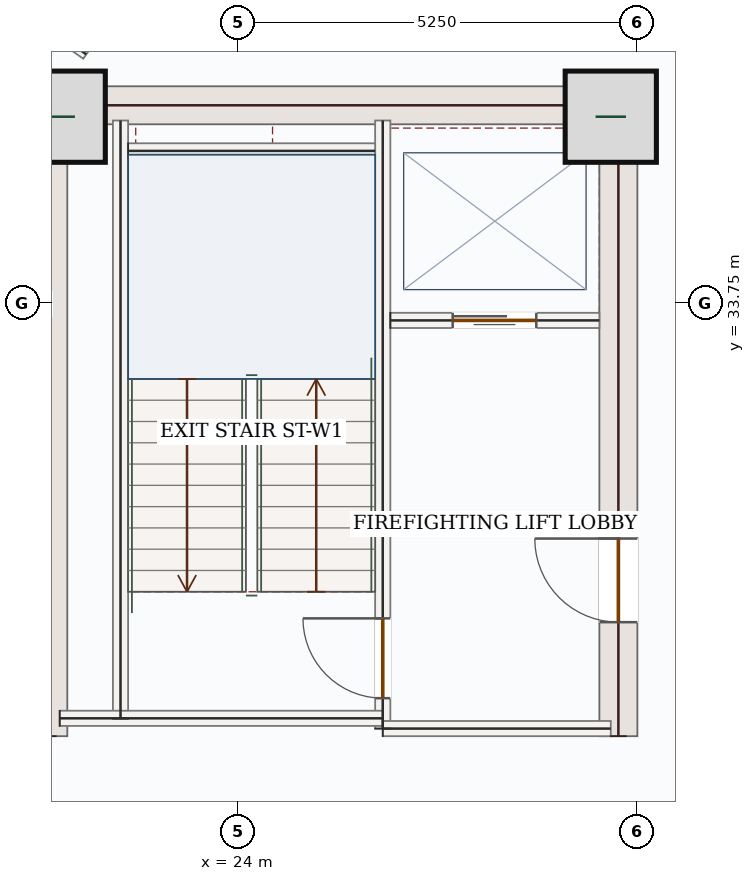
"""IFC4 building model, lengths in metres.
Left out: names, types, materials, properties, quantities, classifications, styles, units other than length and angle.
Written with IfcOpenShell. Run it as: python <this file> out.ifc"""

import sys

from ifc_helpers import new_model, si_unit, direction, frame, frame_2d, origin, origin_2d, place, context, subcontext, project, spatial, rectangle, extrude, source, transform, mapped, element, fill, save


model = new_model("IFC4")
c1 = context("Model", 3, precision=1e-05, world=origin(), true_north=direction((0.0, 1.0)))
c2 = subcontext(c1, "Body", "Model", "MODEL_VIEW")
j1 = project(units=[si_unit("LENGTHUNIT", "METRE"), si_unit("PLANEANGLEUNIT", "RADIAN")], contexts=[c1])
p1 = place(None, origin())
s1 = spatial("IfcSite", under=j1, at=p1, CompositionType="ELEMENT")
p2 = place(p1, origin())
s2 = spatial("IfcBuilding", under=s1, at=p2, CompositionType="ELEMENT")
p3 = place(p2, frame((0.0, 0.0, 143.4)))
s3 = spatial("IfcBuildingStorey", under=s2, at=p3, CompositionType="ELEMENT", Elevation=143.4)
m1 = source(origin(), c2, "Body", "SweptSolid", [
    extrude(rectangle(XDim=8.55, YDim=0.5, at=frame_2d((4.275, 0.0))), origin(), (0.0, 0.0, 1.0), 3.62),
])
p4 = place(p3, frame((21.5, 28.05, 0.0), z_axis=(0.0, 0.0, 1.0), x_axis=(0.0, 1.0, 0.0)))
e1 = element("IfcWall", 1, at=p4, inside=s3, PredefinedType="SHEAR", context=c2, shape_type="MappedRepresentation", body=[
    mapped(m1, transform((0.0, 0.0, 0.0), x_axis=(1.0, 0.0, 0.0), y_axis=(0.0, 1.0, 0.0), z_axis=(0.0, 0.0, 1.0), scale=1.0)),
])
p5 = place(p3, frame((29.0, 28.05, 0.0), z_axis=(0.0, 0.0, 1.0), x_axis=(0.0, 1.0, 0.0)))
e2 = element("IfcWall", 2, at=p5, inside=s3, PredefinedType="SHEAR", context=c2, shape_type="SweptSolid", body=[
    extrude(rectangle(XDim=8.55, YDim=0.5, at=frame_2d((4.275, 0.0))), origin(), (0.0, 0.0, 1.0), 3.62),
])
p6 = place(p5, frame((1.5, 0.0, 0.0)))
e3 = element("IfcOpeningElement", 3, at=p6, cuts=e2, PredefinedType="OPENING", context=c2, shape_type="SweptSolid", body=[
    extrude(rectangle(XDim=1.1, YDim=2.2, at=frame_2d((0.55, 1.1))), frame((0.0, 0.26, 0.0), z_axis=(0.0, -1.0, 0.0), x_axis=(1.0, 0.0, 0.0)), (0.0, 0.0, 1.0), 0.52),
])
m2 = source(origin(), c2, "Body", "SweptSolid", [
    extrude(rectangle(XDim=7.0, YDim=0.5, at=frame_2d((3.5, 0.0))), origin(), (0.0, 0.0, 1.0), 3.62),
])
p7 = place(p3, frame((21.75, 36.35, 0.0), z_axis=(0.0, 0.0, 1.0), x_axis=(1.0, 0.0, 0.0)))
e4 = element("IfcWall", 4, at=p7, inside=s3, PredefinedType="SHEAR", context=c2, shape_type="MappedRepresentation", body=[
    mapped(m2, transform((0.0, 0.0, 0.0), x_axis=(1.0, 0.0, 0.0), y_axis=(0.0, 1.0, 0.0), z_axis=(0.0, 0.0, 1.0), scale=1.0)),
])
m3 = source(origin(), c2, "Body", "SweptSolid", [
    extrude(rectangle(XDim=1.2, YDim=1.2, at=origin_2d()), origin(), (0.0, 0.0, 1.0), 3.9),
])
for number, where, z_axis, x_axis in (
    (5, (21.65, 36.2, 0.0), (0.0, 0.0, 1.0), (1.0, 0.0, 0.0)),
    (6, (28.9, 36.2, 0.0), (0.0, 0.0, 1.0), (1.0, 0.0, 0.0)),
):
    element("IfcColumn", number, at=place(p3, frame(where, z_axis=z_axis, x_axis=x_axis)), inside=s3, PredefinedType="COLUMN", context=c2, shape_type="MappedRepresentation", body=[
        mapped(m3, transform((0.0, 0.0, 0.0), x_axis=(1.0, 0.0, 0.0), y_axis=(0.0, 1.0, 0.0), z_axis=(0.0, 0.0, 1.0), scale=1.0)),
    ])
m4 = source(origin(), c2, "Body", "SweptSolid", [
    extrude(rectangle(XDim=5.258, YDim=0.28, at=frame_2d((2.629, 0.0))), origin(), (0.0, 0.0, 1.0), 3.62),
])
p8 = place(p3, frame((18.94, 35.542, 0.0), z_axis=(0.0, 0.0, 1.0), x_axis=(0.707106781187, 0.707106781187, 0.0)))
e7 = element("IfcWall", 7, at=p8, inside=s3, PredefinedType="SOLIDWALL", context=c2, shape_type="MappedRepresentation", body=[
    mapped(m4, transform((0.0, 0.0, 0.0), x_axis=(1.0, 0.0, 0.0), y_axis=(0.0, 1.0, 0.0), z_axis=(0.0, 0.0, 1.0), scale=1.0)),
])
m5 = source(origin(), c2, "Body", "SweptSolid", [
    extrude(rectangle(XDim=7.87, YDim=0.2, at=frame_2d((3.935, 0.0))), origin(), (0.0, 0.0, 1.0), 3.62),
])
p9 = place(p3, frame((22.45, 28.28, 0.0), z_axis=(0.0, 0.0, 1.0), x_axis=(0.0, 1.0, 0.0)))
e8 = element("IfcWall", 8, at=p9, inside=s3, PredefinedType="SOLIDWALL", context=c2, shape_type="MappedRepresentation", body=[
    mapped(m5, transform((0.0, 0.0, 0.0), x_axis=(1.0, 0.0, 0.0), y_axis=(0.0, 1.0, 0.0), z_axis=(0.0, 0.0, 1.0), scale=1.0)),
])
p10 = place(p3, frame((25.9, 28.15, 0.0), z_axis=(0.0, 0.0, 1.0), x_axis=(0.0, 1.0, 0.0)))
e9 = element("IfcWall", 9, at=p10, inside=s3, PredefinedType="SOLIDWALL", context=c2, shape_type="SweptSolid", body=[
    extrude(rectangle(XDim=8.0, YDim=0.2, at=frame_2d((4.0, 0.0))), origin(), (0.0, 0.0, 1.0), 3.62),
])
p11 = place(p10, frame((0.4, 0.0, 0.0)))
e10 = element("IfcOpeningElement", 10, at=p11, cuts=e9, PredefinedType="OPENING", context=c2, shape_type="SweptSolid", body=[
    extrude(rectangle(XDim=1.05, YDim=2.15, at=frame_2d((0.525, 1.075))), frame((0.0, 0.11, 0.0), z_axis=(0.0, -1.0, 0.0), x_axis=(1.0, 0.0, 0.0)), (0.0, 0.0, 1.0), 0.22),
])
m6 = source(origin(), c2, "Body", "SweptSolid", [
    extrude(rectangle(XDim=4.25, YDim=0.2, at=frame_2d((2.125, 0.0))), origin(), (0.0, 0.0, 1.0), 3.62),
])
p12 = place(p3, frame((21.65, 28.285, 0.0), z_axis=(0.0, 0.0, 1.0), x_axis=(1.0, 0.0, 0.0)))
e11 = element("IfcWall", 11, at=p12, inside=s3, PredefinedType="SOLIDWALL", context=c2, shape_type="MappedRepresentation", body=[
    mapped(m6, transform((0.0, 0.0, 0.0), x_axis=(1.0, 0.0, 0.0), y_axis=(0.0, 1.0, 0.0), z_axis=(0.0, 0.0, 1.0), scale=1.0)),
])
m7 = source(origin(), c2, "Body", "SweptSolid", [
    extrude(rectangle(XDim=3.0, YDim=0.2, at=frame_2d((1.5, 0.0))), origin(), (0.0, 0.0, 1.0), 3.62),
])
p13 = place(p3, frame((25.9, 28.15, 0.0), z_axis=(0.0, 0.0, 1.0), x_axis=(1.0, 0.0, 0.0)))
e12 = element("IfcWall", 12, at=p13, inside=s3, PredefinedType="SOLIDWALL", context=c2, shape_type="MappedRepresentation", body=[
    mapped(m7, transform((0.0, 0.0, 0.0), x_axis=(1.0, 0.0, 0.0), y_axis=(0.0, 1.0, 0.0), z_axis=(0.0, 0.0, 1.0), scale=1.0)),
])
m8 = source(origin(), c2, "Body", "SweptSolid", [
    extrude(rectangle(XDim=3.25, YDim=0.2, at=frame_2d((1.625, 0.0))), origin(), (0.0, 0.0, 1.0), 3.62),
])
p14 = place(p3, frame((22.55, 35.75, 0.0), z_axis=(0.0, 0.0, 1.0), x_axis=(1.0, 0.0, 0.0)))
e13 = element("IfcWall", 13, at=p14, inside=s3, PredefinedType="SOLIDWALL", context=c2, shape_type="MappedRepresentation", body=[
    mapped(m8, transform((0.0, 0.0, 0.0), x_axis=(1.0, 0.0, 0.0), y_axis=(0.0, 1.0, 0.0), z_axis=(0.0, 0.0, 1.0), scale=1.0)),
])
p15 = place(p3, frame((26.0, 33.52, 0.0), z_axis=(0.0, 0.0, 1.0), x_axis=(1.0, 0.0, 0.0)))
e14 = element("IfcWall", 14, at=p15, inside=s3, PredefinedType="SOLIDWALL", context=c2, shape_type="SweptSolid", body=[
    extrude(rectangle(XDim=2.75, YDim=0.2, at=frame_2d((1.375, 0.0))), origin(), (0.0, 0.0, 1.0), 3.62),
])
p16 = place(p15, frame((0.82, 0.0, 0.0)))
e15 = element("IfcOpeningElement", 15, at=p16, cuts=e14, PredefinedType="OPENING", context=c2, shape_type="SweptSolid", body=[
    extrude(rectangle(XDim=1.1, YDim=2.15, at=frame_2d((0.55, 1.075))), frame((0.0, 0.11, 0.0), z_axis=(0.0, -1.0, 0.0), x_axis=(1.0, 0.0, 0.0)), (0.0, 0.0, 1.0), 0.22),
])
m9 = source(origin(), c2, "Body", "SweptSolid", [
    extrude(rectangle(XDim=0.988, YDim=0.14, at=frame_2d((0.494, 0.0))), origin(), (0.0, 0.0, 1.0), 3.62),
])
p17 = place(p3, frame((21.193, 37.59, 0.0), z_axis=(0.0, 0.0, 1.0), x_axis=(0.81652929337, -0.577304004029, 0.0)))
e16 = element("IfcWall", 16, at=p17, inside=s3, PredefinedType="PARTITIONING", context=c2, shape_type="MappedRepresentation", body=[
    mapped(m9, transform((0.0, 0.0, 0.0), x_axis=(1.0, 0.0, 0.0), y_axis=(0.0, 1.0, 0.0), z_axis=(0.0, 0.0, 1.0), scale=1.0)),
])
m10 = source(origin(), c2, "Body", "SweptSolid", [
    extrude(rectangle(XDim=1.05, YDim=2.15, at=frame_2d((0.525, 1.075))), frame((0.0, 0.025, 0.0), z_axis=(0.0, -1.0, 0.0), x_axis=(1.0, 0.0, 0.0)), (0.0, 0.0, 1.0), 0.05),
])
p18 = place(p11, origin())
e17 = element("IfcDoor", 17, at=p18, inside=s3, OperationType="SINGLE_SWING_RIGHT", PredefinedType="DOOR", context=c2, shape_type="MappedRepresentation", body=[
    mapped(m10, transform((0.0, 0.0, 0.0), x_axis=(1.0, 0.0, 0.0), y_axis=(0.0, 1.0, 0.0), z_axis=(0.0, 0.0, 1.0), scale=1.0)),
])
fill(e10, e17)
m11 = source(origin(), c2, "Body", "SweptSolid", [
    extrude(rectangle(XDim=1.1, YDim=2.15, at=frame_2d((0.55, 1.075))), frame((0.0, 0.025, 0.0), z_axis=(0.0, -1.0, 0.0), x_axis=(1.0, 0.0, 0.0)), (0.0, 0.0, 1.0), 0.05),
])
p19 = place(p16, origin())
e18 = element("IfcDoor", 18, at=p19, inside=s3, OperationType="DOUBLE_DOOR_SLIDING", PredefinedType="DOOR", context=c2, shape_type="MappedRepresentation", body=[
    mapped(m11, transform((0.0, 0.0, 0.0), x_axis=(1.0, 0.0, 0.0), y_axis=(0.0, 1.0, 0.0), z_axis=(0.0, 0.0, 1.0), scale=1.0)),
])
fill(e15, e18)
m12 = source(origin(), c2, "Body", "SweptSolid", [
    extrude(rectangle(XDim=1.1, YDim=2.2, at=frame_2d((0.55, 1.1))), frame((0.0, 0.025, 0.0), z_axis=(0.0, -1.0, 0.0), x_axis=(1.0, 0.0, 0.0)), (0.0, 0.0, 1.0), 0.05),
])
p20 = place(p6, origin())
e19 = element("IfcDoor", 19, at=p20, inside=s3, OperationType="SINGLE_SWING_RIGHT", PredefinedType="DOOR", context=c2, shape_type="MappedRepresentation", body=[
    mapped(m12, transform((0.0, 0.0, 0.0), x_axis=(1.0, 0.0, 0.0), y_axis=(0.0, 1.0, 0.0), z_axis=(0.0, 0.0, 1.0), scale=1.0)),
])
fill(e3, e19)
save(model, sys.argv[1])
